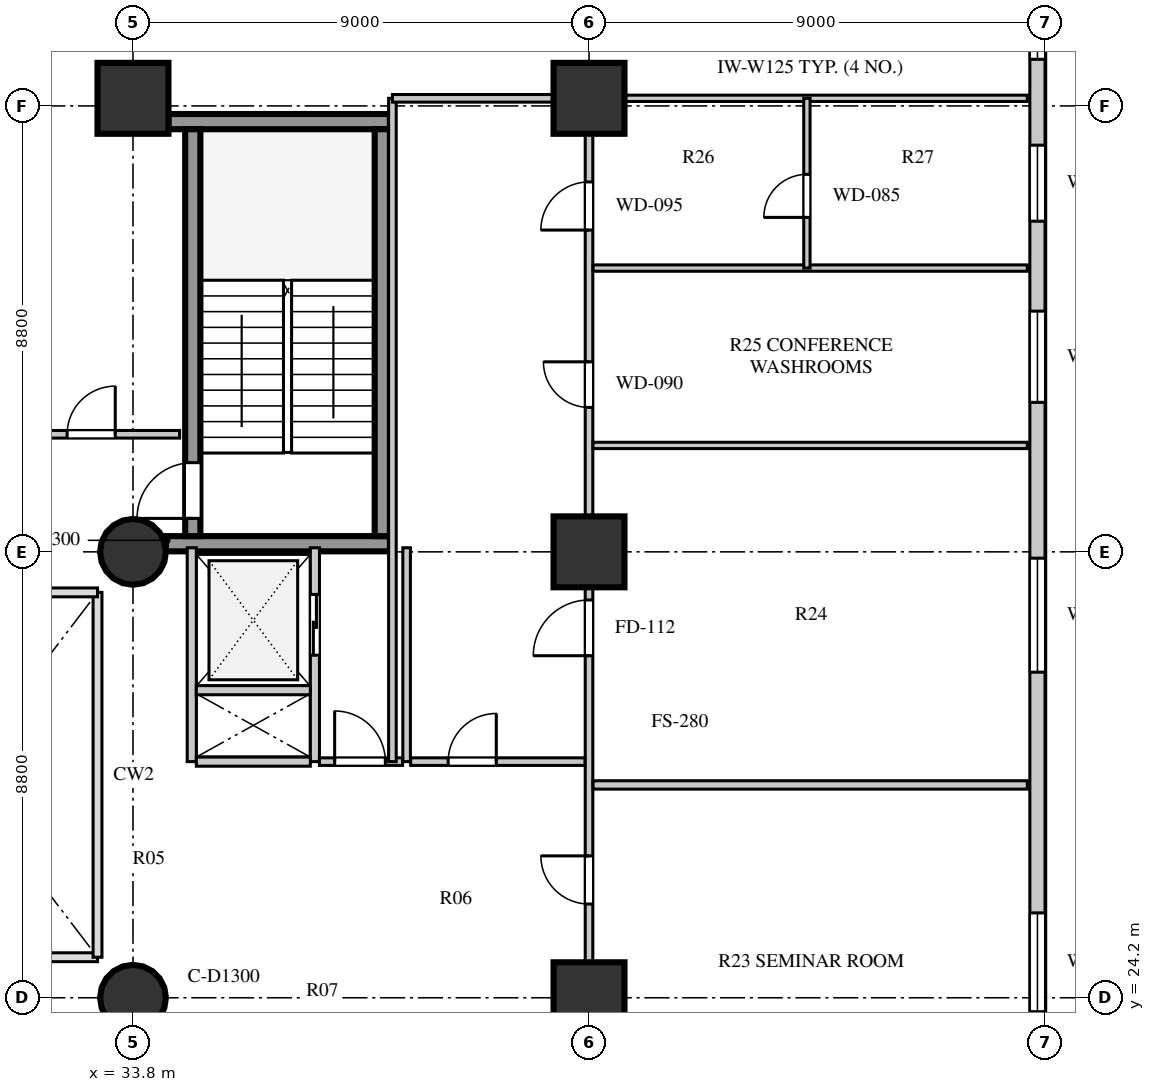
"""IFC4 building model, lengths in metres.
Left out: names, types, materials, properties, quantities, classifications, styles, units other than length and angle.
Written with IfcOpenShell. Run it as: python <this file> out.ifc"""

import sys

from ifc_helpers import new_model, si_unit, direction, frame, frame_2d, origin, origin_2d, place, context, subcontext, project, spatial, rectangle, circle, extrude, element, fill, save


model = new_model("IFC4")
c1 = context("Model", 3, precision=1e-05, world=origin(), true_north=direction((0.0, 1.0)))
c2 = subcontext(c1, "Body", "Model", "MODEL_VIEW")
j1 = project(units=[si_unit("LENGTHUNIT", "METRE"), si_unit("PLANEANGLEUNIT", "RADIAN")], contexts=[c1])
p1 = place(None, origin())
s1 = spatial("IfcSite", under=j1, at=p1, CompositionType="ELEMENT")
p2 = place(p1, origin())
s2 = spatial("IfcBuilding", under=s1, at=p2, CompositionType="ELEMENT")
p3 = place(p2, frame((0.0, 0.0, 17.0)))
s3 = spatial("IfcBuildingStorey", under=s2, at=p3, CompositionType="ELEMENT", Elevation=17.0)
p4 = place(p3, frame((34.45, 33.16, 0.0), z_axis=(0.0, 0.0, 1.0), x_axis=(1.0, 0.0, 0.0)))
e1 = element("IfcWall", 1, at=p4, inside=s3, PredefinedType="SHEAR", context=c2, shape_type="SweptSolid", body=[
    extrude(rectangle(XDim=4.42, YDim=0.3, at=frame_2d((2.21, 0.0))), origin(), (0.0, 0.0, 1.0), 4.22),
])
p5 = place(p3, frame((34.5, 41.49, 0.0), z_axis=(0.0, 0.0, 1.0), x_axis=(1.0, 0.0, 0.0)))
e2 = element("IfcWall", 2, at=p5, inside=s3, PredefinedType="SHEAR", context=c2, shape_type="SweptSolid", body=[
    extrude(rectangle(XDim=4.37, YDim=0.3, at=frame_2d((2.185, 0.0))), origin(), (0.0, 0.0, 1.0), 4.22),
])
p6 = place(p3, frame((34.98, 33.31, 0.0), z_axis=(0.0, 0.0, 1.0), x_axis=(0.0, 1.0, 0.0)))
e3 = element("IfcWall", 3, at=p6, inside=s3, PredefinedType="SHEAR", context=c2, shape_type="SweptSolid", body=[
    extrude(rectangle(XDim=8.03, YDim=0.3, at=frame_2d((4.015, 0.0))), origin(), (0.0, 0.0, 1.0), 4.22),
])
p7 = place(p6, frame((0.35, 0.0, 0.0)))
e4 = element("IfcOpeningElement", 4, at=p7, cuts=e3, PredefinedType="OPENING", context=c2, shape_type="SweptSolid", body=[
    extrude(rectangle(XDim=1.1, YDim=2.1, at=frame_2d((0.55, 1.05))), frame((0.0, 0.16, 0.0), z_axis=(0.0, -1.0, 0.0), x_axis=(1.0, 0.0, 0.0)), (0.0, 0.0, 1.0), 0.32),
])
p8 = place(p3, frame((38.72, 33.31, 0.0), z_axis=(0.0, 0.0, 1.0), x_axis=(0.0, 1.0, 0.0)))
e5 = element("IfcWall", 5, at=p8, inside=s3, PredefinedType="SHEAR", context=c2, shape_type="SweptSolid", body=[
    extrude(rectangle(XDim=8.03, YDim=0.3, at=frame_2d((4.015, 0.0))), origin(), (0.0, 0.0, 1.0), 4.22),
])
for number, where, z_axis, x_axis in (
    (6, (33.8, 24.2, 0.0), (0.0, 0.0, 1.0), (1.0, 0.0, 0.0)),
    (7, (33.8, 33.0, 0.0), (0.0, 0.0, 1.0), (1.0, 0.0, 0.0)),
):
    element("IfcColumn", number, at=place(p3, frame(where, z_axis=z_axis, x_axis=x_axis)), inside=s3, PredefinedType="COLUMN", context=c2, shape_type="SweptSolid", body=[
        extrude(circle(Radius=0.65, at=origin_2d()), origin(), (0.0, 0.0, 1.0), 4.22),
    ])
for number, where, z_axis, x_axis in (
    (8, (33.8, 41.95, 0.0), (0.0, 0.0, 1.0), (1.0, 0.0, 0.0)),
    (9, (42.8, 24.2, 0.0), (0.0, 0.0, 1.0), (1.0, 0.0, 0.0)),
    (10, (42.8, 33.0, 0.0), (0.0, 0.0, 1.0), (1.0, 0.0, 0.0)),
    (11, (42.8, 41.95, 0.0), (0.0, 0.0, 1.0), (1.0, 0.0, 0.0)),
):
    element("IfcColumn", number, at=place(p3, frame(where, z_axis=z_axis, x_axis=x_axis)), inside=s3, PredefinedType="COLUMN", context=c2, shape_type="SweptSolid", body=[
        extrude(rectangle(XDim=1.4, YDim=1.4, at=origin_2d()), origin(), (0.0, 0.0, 1.0), 4.22),
    ])
p9 = place(p3, frame((51.65, 12.4, 0.0), z_axis=(0.0, 0.0, 1.0), x_axis=(0.0, 1.0, 0.0)))
e12 = element("IfcWall", 12, at=p9, inside=s3, PredefinedType="STANDARD", context=c2, shape_type="SweptSolid", body=[
    extrude(rectangle(XDim=32.4, YDim=0.3, at=frame_2d((16.2, 0.0))), origin(), (0.0, 0.0, 1.0), 4.22),
])
p10 = place(p9, frame((0.805, 0.0, 0.8)))
e13 = element("IfcOpeningElement", 13, at=p10, cuts=e12, PredefinedType="OPENING", context=c2, shape_type="SweptSolid", body=[
    extrude(rectangle(XDim=1.35, YDim=1.9, at=frame_2d((0.675, 0.95))), frame((0.0, 0.16, 0.0), z_axis=(0.0, -1.0, 0.0), x_axis=(1.0, 0.0, 0.0)), (0.0, 0.0, 1.0), 0.32),
])
p11 = place(p9, frame((5.1, 0.0, 0.8)))
e14 = element("IfcOpeningElement", 14, at=p11, cuts=e12, PredefinedType="OPENING", context=c2, shape_type="SweptSolid", body=[
    extrude(rectangle(XDim=1.65, YDim=1.95, at=frame_2d((0.825, 0.975))), frame((0.0, 0.16, 0.0), z_axis=(0.0, -1.0, 0.0), x_axis=(1.0, 0.0, 0.0)), (0.0, 0.0, 1.0), 0.32),
])
p12 = place(p9, frame((11.525, 0.0, 0.8)))
e15 = element("IfcOpeningElement", 15, at=p12, cuts=e12, PredefinedType="OPENING", context=c2, shape_type="SweptSolid", body=[
    extrude(rectangle(XDim=1.95, YDim=2.0, at=frame_2d((0.975, 1.0))), frame((0.0, 0.16, 0.0), z_axis=(0.0, -1.0, 0.0), x_axis=(1.0, 0.0, 0.0)), (0.0, 0.0, 1.0), 0.32),
])
p13 = place(p9, frame((18.225, 0.0, 0.8)))
e16 = element("IfcOpeningElement", 16, at=p13, cuts=e12, PredefinedType="OPENING", context=c2, shape_type="SweptSolid", body=[
    extrude(rectangle(XDim=2.25, YDim=2.0, at=frame_2d((1.125, 1.0))), frame((0.0, 0.16, 0.0), z_axis=(0.0, -1.0, 0.0), x_axis=(1.0, 0.0, 0.0)), (0.0, 0.0, 1.0), 0.32),
])
p14 = place(p9, frame((23.55, 0.0, 0.8)))
e17 = element("IfcOpeningElement", 17, at=p14, cuts=e12, PredefinedType="OPENING", context=c2, shape_type="SweptSolid", body=[
    extrude(rectangle(XDim=1.8, YDim=2.0, at=frame_2d((0.9, 1.0))), frame((0.0, 0.16, 0.0), z_axis=(0.0, -1.0, 0.0), x_axis=(1.0, 0.0, 0.0)), (0.0, 0.0, 1.0), 0.32),
])
p15 = place(p9, frame((27.125, 0.0, 0.8)))
e18 = element("IfcOpeningElement", 18, at=p15, cuts=e12, PredefinedType="OPENING", context=c2, shape_type="SweptSolid", body=[
    extrude(rectangle(XDim=1.5, YDim=2.0, at=frame_2d((0.75, 1.0))), frame((0.0, 0.16, 0.0), z_axis=(0.0, -1.0, 0.0), x_axis=(1.0, 0.0, 0.0)), (0.0, 0.0, 1.0), 0.32),
])
p16 = place(p9, frame((30.32, 0.0, 0.8)))
e19 = element("IfcOpeningElement", 19, at=p16, cuts=e12, PredefinedType="OPENING", context=c2, shape_type="SweptSolid", body=[
    extrude(rectangle(XDim=1.2, YDim=1.75, at=frame_2d((0.6, 0.875))), frame((0.0, 0.16, 0.0), z_axis=(0.0, -1.0, 0.0), x_axis=(1.0, 0.0, 0.0)), (0.0, 0.0, 1.0), 0.32),
])
p17 = place(p3, frame((34.96, 28.86, 0.0), z_axis=(0.0, 0.0, 1.0), x_axis=(0.0, 1.0, 0.0)))
e20 = element("IfcWall", 20, at=p17, inside=s3, PredefinedType="SOLIDWALL", context=c2, shape_type="SweptSolid", body=[
    extrude(rectangle(XDim=4.22, YDim=0.18, at=frame_2d((2.11, 0.0))), origin(), (0.0, 0.0, 1.0), 4.22),
])
p18 = place(p3, frame((37.39, 28.86, 0.0), z_axis=(0.0, 0.0, 1.0), x_axis=(0.0, 1.0, 0.0)))
e21 = element("IfcWall", 21, at=p18, inside=s3, PredefinedType="SOLIDWALL", context=c2, shape_type="SweptSolid", body=[
    extrude(rectangle(XDim=4.22, YDim=0.18, at=frame_2d((2.11, 0.0))), origin(), (0.0, 0.0, 1.0), 4.22),
])
p19 = place(p18, frame((2.1, 0.0, 0.0)))
e22 = element("IfcOpeningElement", 22, at=p19, cuts=e21, PredefinedType="OPENING", context=c2, shape_type="SweptSolid", body=[
    extrude(rectangle(XDim=1.2, YDim=2.12, at=frame_2d((0.6, 1.06))), frame((0.0, 0.1, 0.0), z_axis=(0.0, -1.0, 0.0), x_axis=(1.0, 0.0, 0.0)), (0.0, 0.0, 1.0), 0.2),
])
for number, where, z_axis, x_axis in (
    (23, (35.05, 28.86, 0.0), (0.0, 0.0, 1.0), (1.0, 0.0, 0.0)),
    (24, (35.05, 30.27, 0.0), (0.0, 0.0, 1.0), (1.0, 0.0, 0.0)),
):
    element("IfcWall", number, at=place(p3, frame(where, z_axis=z_axis, x_axis=x_axis)), inside=s3, PredefinedType="SOLIDWALL", context=c2, shape_type="SweptSolid", body=[
        extrude(rectangle(XDim=2.25, YDim=0.18, at=frame_2d((1.125, 0.0))), origin(), (0.0, 0.0, 1.0), 4.22),
    ])
p20 = place(p3, frame((39.2, 28.86, 0.0), z_axis=(0.0, 0.0, 1.0), x_axis=(0.0, 1.0, 0.0)))
e25 = element("IfcWall", 25, at=p20, inside=s3, PredefinedType="PARTITIONING", context=c2, shape_type="SweptSolid", body=[
    extrude(rectangle(XDim=4.22, YDim=0.15, at=frame_2d((2.11, 0.0))), origin(), (0.0, 0.0, 1.0), 4.22),
])
p21 = place(p3, frame((37.48, 28.86, 0.0), z_axis=(0.0, 0.0, 1.0), x_axis=(1.0, 0.0, 0.0)))
e26 = element("IfcWall", 26, at=p21, inside=s3, PredefinedType="PARTITIONING", context=c2, shape_type="SweptSolid", body=[
    extrude(rectangle(XDim=1.64, YDim=0.15, at=frame_2d((0.82, 0.0))), origin(), (0.0, 0.0, 1.0), 4.22),
])
p22 = place(p21, frame((0.3, 0.0, 0.0)))
e27 = element("IfcOpeningElement", 27, at=p22, cuts=e26, PredefinedType="OPENING", context=c2, shape_type="SweptSolid", body=[
    extrude(rectangle(XDim=1.0, YDim=2.1, at=frame_2d((0.5, 1.05))), frame((0.0, 0.085, 0.0), z_axis=(0.0, -1.0, 0.0), x_axis=(1.0, 0.0, 0.0)), (0.0, 0.0, 1.0), 0.17),
])
p23 = place(p3, frame((27.5, 35.32, 0.0), z_axis=(0.0, 0.0, 1.0), x_axis=(1.0, 0.0, 0.0)))
e28 = element("IfcWall", 28, at=p23, inside=s3, PredefinedType="PARTITIONING", context=c2, shape_type="SweptSolid", body=[
    extrude(rectangle(XDim=7.22, YDim=0.15, at=frame_2d((3.61, 0.0))), origin(), (0.0, 0.0, 1.0), 4.22),
])
p24 = place(p23, frame((5.0, 0.0, 0.0)))
e29 = element("IfcOpeningElement", 29, at=p24, cuts=e28, PredefinedType="OPENING", context=c2, shape_type="SweptSolid", body=[
    extrude(rectangle(XDim=0.95, YDim=2.08, at=frame_2d((0.475, 1.04))), frame((0.0, 0.085, 0.0), z_axis=(0.0, -1.0, 0.0), x_axis=(1.0, 0.0, 0.0)), (0.0, 0.0, 1.0), 0.17),
])
p25 = place(p23, frame((2.0, 0.0, 0.0)))
e30 = element("IfcOpeningElement", 30, at=p25, cuts=e28, PredefinedType="OPENING", context=c2, shape_type="SweptSolid", body=[
    extrude(rectangle(XDim=1.35, YDim=2.1, at=frame_2d((0.675, 1.05))), frame((0.0, 0.085, 0.0), z_axis=(0.0, -1.0, 0.0), x_axis=(1.0, 0.0, 0.0)), (0.0, 0.0, 1.0), 0.17),
])
p26 = place(p3, frame((42.8, 15.25, 0.0), z_axis=(0.0, 0.0, 1.0), x_axis=(0.0, 1.0, 0.0)))
e31 = element("IfcWall", 31, at=p26, inside=s3, PredefinedType="PARTITIONING", context=c2, shape_type="SweptSolid", body=[
    extrude(rectangle(XDim=26.7, YDim=0.15, at=frame_2d((13.35, 0.0))), origin(), (0.0, 0.0, 1.0), 3.42),
])
p27 = place(p26, frame((2.6, 0.0, 0.0)))
e32 = element("IfcOpeningElement", 32, at=p27, cuts=e31, PredefinedType="OPENING", context=c2, shape_type="SweptSolid", body=[
    extrude(rectangle(XDim=0.95, YDim=2.08, at=frame_2d((0.475, 1.04))), frame((0.0, 0.085, 0.0), z_axis=(0.0, -1.0, 0.0), x_axis=(1.0, 0.0, 0.0)), (0.0, 0.0, 1.0), 0.17),
])
p28 = place(p26, frame((10.8, 0.0, 0.0)))
e33 = element("IfcOpeningElement", 33, at=p28, cuts=e31, PredefinedType="OPENING", context=c2, shape_type="SweptSolid", body=[
    extrude(rectangle(XDim=0.95, YDim=2.08, at=frame_2d((0.475, 1.04))), frame((0.0, 0.085, 0.0), z_axis=(0.0, -1.0, 0.0), x_axis=(1.0, 0.0, 0.0)), (0.0, 0.0, 1.0), 0.17),
])
p29 = place(p26, frame((15.7, 0.0, 0.0)))
e34 = element("IfcOpeningElement", 34, at=p29, cuts=e31, PredefinedType="OPENING", context=c2, shape_type="SweptSolid", body=[
    extrude(rectangle(XDim=1.1, YDim=2.12, at=frame_2d((0.55, 1.06))), frame((0.0, 0.085, 0.0), z_axis=(0.0, -1.0, 0.0), x_axis=(1.0, 0.0, 0.0)), (0.0, 0.0, 1.0), 0.17),
])
p30 = place(p26, frame((20.6, 0.0, 0.0)))
e35 = element("IfcOpeningElement", 35, at=p30, cuts=e31, PredefinedType="OPENING", context=c2, shape_type="SweptSolid", body=[
    extrude(rectangle(XDim=0.9, YDim=2.05, at=frame_2d((0.45, 1.025))), frame((0.0, 0.085, 0.0), z_axis=(0.0, -1.0, 0.0), x_axis=(1.0, 0.0, 0.0)), (0.0, 0.0, 1.0), 0.17),
])
p31 = place(p26, frame((24.1, 0.0, 0.0)))
e36 = element("IfcOpeningElement", 36, at=p31, cuts=e31, PredefinedType="OPENING", context=c2, shape_type="SweptSolid", body=[
    extrude(rectangle(XDim=0.95, YDim=2.05, at=frame_2d((0.475, 1.025))), frame((0.0, 0.085, 0.0), z_axis=(0.0, -1.0, 0.0), x_axis=(1.0, 0.0, 0.0)), (0.0, 0.0, 1.0), 0.17),
])
p32 = place(p3, frame((42.88, 41.95, 0.0), z_axis=(0.0, 0.0, 1.0), x_axis=(1.0, 0.0, 0.0)))
e37 = element("IfcWall", 37, at=p32, inside=s3, PredefinedType="PLUMBINGWALL", context=c2, shape_type="SweptSolid", body=[
    extrude(rectangle(XDim=8.57, YDim=0.125, at=frame_2d((4.285, 0.0))), origin(), (0.0, 0.0, 1.0), 3.72),
])
p33 = place(p3, frame((39.28, 28.86, 0.0), z_axis=(0.0, 0.0, 1.0), x_axis=(1.0, 0.0, 0.0)))
e38 = element("IfcWall", 38, at=p33, inside=s3, PredefinedType="PARTITIONING", context=c2, shape_type="SweptSolid", body=[
    extrude(rectangle(XDim=3.44, YDim=0.15, at=frame_2d((1.72, 0.0))), origin(), (0.0, 0.0, 1.0), 4.22),
])
p34 = place(p33, frame((0.74, 0.0, 0.0)))
e39 = element("IfcOpeningElement", 39, at=p34, cuts=e38, PredefinedType="OPENING", context=c2, shape_type="SweptSolid", body=[
    extrude(rectangle(XDim=0.95, YDim=2.08, at=frame_2d((0.475, 1.04))), frame((0.0, 0.085, 0.0), z_axis=(0.0, -1.0, 0.0), x_axis=(1.0, 0.0, 0.0)), (0.0, 0.0, 1.0), 0.17),
])
p35 = place(p3, frame((38.92, 28.86, 0.0), z_axis=(0.0, 0.0, 1.0), x_axis=(0.0, 1.0, 0.0)))
e40 = element("IfcWall", 40, at=p35, inside=s3, PredefinedType="PARTITIONING", context=c2, shape_type="SweptSolid", body=[
    extrude(rectangle(XDim=13.09, YDim=0.15, at=frame_2d((6.545, 0.0))), origin(), (0.0, 0.0, 1.0), 4.22),
])
p36 = place(p3, frame((38.92, 41.95, 0.0), z_axis=(0.0, 0.0, 1.0), x_axis=(1.0, 0.0, 0.0)))
e41 = element("IfcWall", 41, at=p36, inside=s3, PredefinedType="PARTITIONING", context=c2, shape_type="SweptSolid", body=[
    extrude(rectangle(XDim=3.88, YDim=0.15, at=frame_2d((1.94, 0.0))), origin(), (0.0, 0.0, 1.0), 3.42),
])
p37 = place(p3, frame((42.88, 28.4, 0.0), z_axis=(0.0, 0.0, 1.0), x_axis=(1.0, 0.0, 0.0)))
e42 = element("IfcWall", 42, at=p37, inside=s3, PredefinedType="PARTITIONING", context=c2, shape_type="SweptSolid", body=[
    extrude(rectangle(XDim=8.57, YDim=0.165, at=frame_2d((4.285, 0.0))), origin(), (0.0, 0.0, 1.0), 4.22),
])
for number, where, z_axis, x_axis in (
    (43, (42.88, 35.1, 0.0), (0.0, 0.0, 1.0), (1.0, 0.0, 0.0)),
    (44, (42.88, 38.6, 0.0), (0.0, 0.0, 1.0), (1.0, 0.0, 0.0)),
):
    element("IfcWall", number, at=place(p3, frame(where, z_axis=z_axis, x_axis=x_axis)), inside=s3, PredefinedType="PLUMBINGWALL", context=c2, shape_type="SweptSolid", body=[
        extrude(rectangle(XDim=8.57, YDim=0.125, at=frame_2d((4.285, 0.0))), origin(), (0.0, 0.0, 1.0), 4.22),
    ])
p38 = place(p3, frame((47.1, 38.6, 0.0), z_axis=(0.0, 0.0, 1.0), x_axis=(0.0, 1.0, 0.0)))
e45 = element("IfcWall", 45, at=p38, inside=s3, PredefinedType="PLUMBINGWALL", context=c2, shape_type="SweptSolid", body=[
    extrude(rectangle(XDim=3.35, YDim=0.125, at=frame_2d((1.675, 0.0))), origin(), (0.0, 0.0, 1.0), 4.22),
])
p39 = place(p38, frame((1.0, 0.0, 0.0)))
e46 = element("IfcOpeningElement", 46, at=p39, cuts=e45, PredefinedType="OPENING", context=c2, shape_type="SweptSolid", body=[
    extrude(rectangle(XDim=0.85, YDim=2.05, at=frame_2d((0.425, 1.025))), frame((0.0, 0.073, 0.0), z_axis=(0.0, -1.0, 0.0), x_axis=(1.0, 0.0, 0.0)), (0.0, 0.0, 1.0), 0.145),
])
p40 = place(p12, origin())
e47 = element("IfcWindow", 47, at=p40, inside=s3, PartitioningType="SINGLE_PANEL", PredefinedType="WINDOW", context=c2, shape_type="SweptSolid", body=[
    extrude(rectangle(XDim=1.95, YDim=2.0, at=frame_2d((0.975, 1.0))), frame((0.0, 0.03, 0.0), z_axis=(0.0, -1.0, 0.0), x_axis=(1.0, 0.0, 0.0)), (0.0, 0.0, 1.0), 0.06),
])
fill(e15, e47)
p41 = place(p13, origin())
e48 = element("IfcWindow", 48, at=p41, inside=s3, PartitioningType="SINGLE_PANEL", PredefinedType="WINDOW", context=c2, shape_type="SweptSolid", body=[
    extrude(rectangle(XDim=2.25, YDim=2.0, at=frame_2d((1.125, 1.0))), frame((0.0, 0.03, 0.0), z_axis=(0.0, -1.0, 0.0), x_axis=(1.0, 0.0, 0.0)), (0.0, 0.0, 1.0), 0.06),
])
fill(e16, e48)
p42 = place(p14, origin())
e49 = element("IfcWindow", 49, at=p42, inside=s3, PartitioningType="SINGLE_PANEL", PredefinedType="WINDOW", context=c2, shape_type="SweptSolid", body=[
    extrude(rectangle(XDim=1.8, YDim=2.0, at=frame_2d((0.9, 1.0))), frame((0.0, 0.03, 0.0), z_axis=(0.0, -1.0, 0.0), x_axis=(1.0, 0.0, 0.0)), (0.0, 0.0, 1.0), 0.06),
])
fill(e17, e49)
p43 = place(p15, origin())
e50 = element("IfcWindow", 50, at=p43, inside=s3, PartitioningType="SINGLE_PANEL", PredefinedType="WINDOW", context=c2, shape_type="SweptSolid", body=[
    extrude(rectangle(XDim=1.5, YDim=2.0, at=frame_2d((0.75, 1.0))), frame((0.0, 0.03, 0.0), z_axis=(0.0, -1.0, 0.0), x_axis=(1.0, 0.0, 0.0)), (0.0, 0.0, 1.0), 0.06),
])
fill(e18, e50)
p44 = place(p16, origin())
e51 = element("IfcWindow", 51, at=p44, inside=s3, PartitioningType="SINGLE_PANEL", PredefinedType="WINDOW", context=c2, shape_type="SweptSolid", body=[
    extrude(rectangle(XDim=1.2, YDim=1.75, at=frame_2d((0.6, 0.875))), frame((0.0, 0.03, 0.0), z_axis=(0.0, -1.0, 0.0), x_axis=(1.0, 0.0, 0.0)), (0.0, 0.0, 1.0), 0.06),
])
fill(e19, e51)
p45 = place(p7, origin())
e52 = element("IfcDoor", 52, at=p45, inside=s3, OperationType="SINGLE_SWING_LEFT", PredefinedType="DOOR", context=c2, shape_type="SweptSolid", body=[
    extrude(rectangle(XDim=1.1, YDim=2.1, at=frame_2d((0.55, 1.05))), frame((0.0, 0.025, 0.0), z_axis=(0.0, -1.0, 0.0), x_axis=(1.0, 0.0, 0.0)), (0.0, 0.0, 1.0), 0.05),
])
fill(e4, e52)
p46 = place(p19, frame((1.2, 0.0, 0.0), z_axis=(0.0, 0.0, 1.0), x_axis=(-1.0, 0.0, 0.0)))
e53 = element("IfcDoor", 53, at=p46, inside=s3, OperationType="DOUBLE_DOOR_SLIDING", PredefinedType="DOOR", context=c2, shape_type="SweptSolid", body=[
    extrude(rectangle(XDim=1.2, YDim=2.12, at=frame_2d((0.6, 1.06))), frame((0.0, 0.025, 0.0), z_axis=(0.0, -1.0, 0.0), x_axis=(1.0, 0.0, 0.0)), (0.0, 0.0, 1.0), 0.05),
])
fill(e22, e53)
p47 = place(p22, origin())
e54 = element("IfcDoor", 54, at=p47, inside=s3, OperationType="SINGLE_SWING_LEFT", PredefinedType="DOOR", context=c2, shape_type="SweptSolid", body=[
    extrude(rectangle(XDim=1.0, YDim=2.1, at=frame_2d((0.5, 1.05))), frame((0.0, 0.025, 0.0), z_axis=(0.0, -1.0, 0.0), x_axis=(1.0, 0.0, 0.0)), (0.0, 0.0, 1.0), 0.05),
])
fill(e27, e54)
p48 = place(p34, frame((0.95, 0.0, 0.0), z_axis=(0.0, 0.0, 1.0), x_axis=(-1.0, 0.0, 0.0)))
e55 = element("IfcDoor", 55, at=p48, inside=s3, OperationType="SINGLE_SWING_LEFT", PredefinedType="DOOR", context=c2, shape_type="SweptSolid", body=[
    extrude(rectangle(XDim=0.95, YDim=2.08, at=frame_2d((0.475, 1.04))), frame((0.0, 0.025, 0.0), z_axis=(0.0, -1.0, 0.0), x_axis=(1.0, 0.0, 0.0)), (0.0, 0.0, 1.0), 0.05),
])
fill(e39, e55)
p49 = place(p24, origin())
e56 = element("IfcDoor", 56, at=p49, inside=s3, OperationType="SINGLE_SWING_RIGHT", PredefinedType="DOOR", context=c2, shape_type="SweptSolid", body=[
    extrude(rectangle(XDim=0.95, YDim=2.08, at=frame_2d((0.475, 1.04))), frame((0.0, 0.025, 0.0), z_axis=(0.0, -1.0, 0.0), x_axis=(1.0, 0.0, 0.0)), (0.0, 0.0, 1.0), 0.05),
])
fill(e29, e56)
p50 = place(p39, origin())
e57 = element("IfcDoor", 57, at=p50, inside=s3, OperationType="SINGLE_SWING_LEFT", PredefinedType="DOOR", context=c2, shape_type="SweptSolid", body=[
    extrude(rectangle(XDim=0.85, YDim=2.05, at=frame_2d((0.425, 1.025))), frame((0.0, 0.025, 0.0), z_axis=(0.0, -1.0, 0.0), x_axis=(1.0, 0.0, 0.0)), (0.0, 0.0, 1.0), 0.05),
])
fill(e46, e57)
p51 = place(p28, origin())
e58 = element("IfcDoor", 58, at=p51, inside=s3, OperationType="SINGLE_SWING_RIGHT", PredefinedType="DOOR", context=c2, shape_type="SweptSolid", body=[
    extrude(rectangle(XDim=0.95, YDim=2.08, at=frame_2d((0.475, 1.04))), frame((0.0, 0.025, 0.0), z_axis=(0.0, -1.0, 0.0), x_axis=(1.0, 0.0, 0.0)), (0.0, 0.0, 1.0), 0.05),
])
fill(e33, e58)
p52 = place(p29, origin())
e59 = element("IfcDoor", 59, at=p52, inside=s3, OperationType="SINGLE_SWING_LEFT", PredefinedType="DOOR", context=c2, shape_type="SweptSolid", body=[
    extrude(rectangle(XDim=1.1, YDim=2.12, at=frame_2d((0.55, 1.06))), frame((0.0, 0.025, 0.0), z_axis=(0.0, -1.0, 0.0), x_axis=(1.0, 0.0, 0.0)), (0.0, 0.0, 1.0), 0.05),
])
fill(e34, e59)
p53 = place(p30, origin())
e60 = element("IfcDoor", 60, at=p53, inside=s3, OperationType="SINGLE_SWING_RIGHT", PredefinedType="DOOR", context=c2, shape_type="SweptSolid", body=[
    extrude(rectangle(XDim=0.9, YDim=2.05, at=frame_2d((0.45, 1.025))), frame((0.0, 0.025, 0.0), z_axis=(0.0, -1.0, 0.0), x_axis=(1.0, 0.0, 0.0)), (0.0, 0.0, 1.0), 0.05),
])
fill(e35, e60)
p54 = place(p31, origin())
e61 = element("IfcDoor", 61, at=p54, inside=s3, OperationType="SINGLE_SWING_LEFT", PredefinedType="DOOR", context=c2, shape_type="SweptSolid", body=[
    extrude(rectangle(XDim=0.95, YDim=2.05, at=frame_2d((0.475, 1.025))), frame((0.0, 0.025, 0.0), z_axis=(0.0, -1.0, 0.0), x_axis=(1.0, 0.0, 0.0)), (0.0, 0.0, 1.0), 0.05),
])
fill(e36, e61)
save(model, sys.argv[1])
